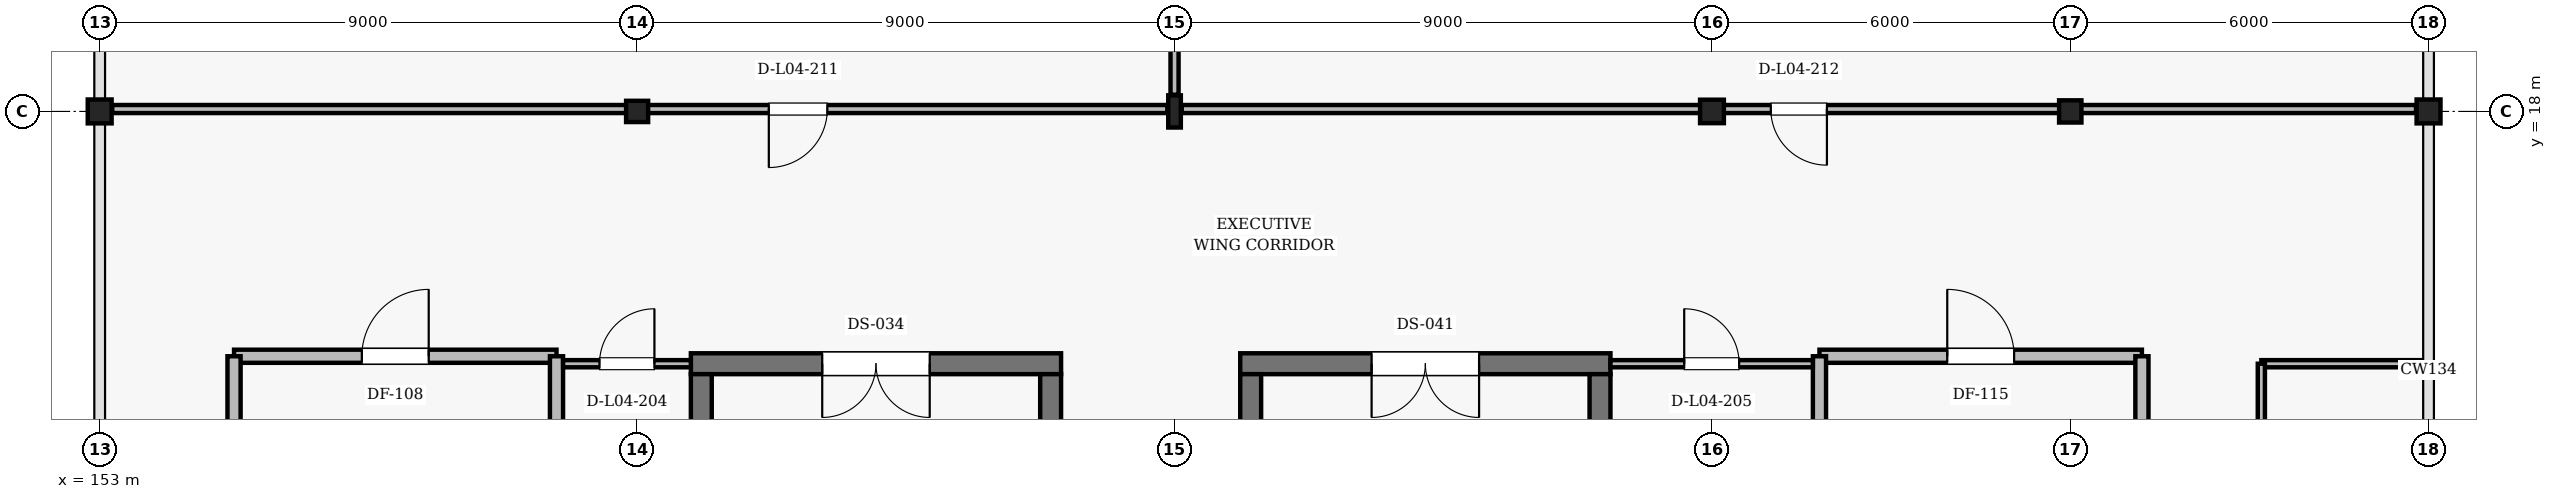
"""IFC4 building model, lengths in metres.
Left out: names, types, materials, properties, quantities, classifications, styles, units other than length and angle.
Written with IfcOpenShell. Run it as: python <this file> out.ifc"""

import sys

from ifc_helpers import new_model, si_unit, direction, frame, frame_2d, origin, origin_2d, place, context, subcontext, project, spatial, rectangle, hollow_rectangle, i_section, extrude, element, fill, save


model = new_model("IFC4")
c1 = context("Model", 3, precision=1e-05, world=origin(), true_north=direction((0.0, 1.0)))
c2 = subcontext(c1, "Body", "Model", "MODEL_VIEW")
j1 = project(units=[si_unit("LENGTHUNIT", "METRE"), si_unit("PLANEANGLEUNIT", "RADIAN")], contexts=[c1])
p1 = place(None, origin())
s1 = spatial("IfcSite", under=j1, at=p1, CompositionType="ELEMENT")
p2 = place(p1, origin())
s2 = spatial("IfcBuilding", under=s1, at=p2, CompositionType="ELEMENT")
p3 = place(p2, frame((0.0, 0.0, 20.4)))
s3 = spatial("IfcBuildingStorey", under=s2, at=p3, CompositionType="ELEMENT", Elevation=20.4)
p4 = place(p3, frame((153.0, 18.0, 0.0), z_axis=(0.0, 0.0, 1.0), x_axis=(1.0, 0.0, 0.0)))
e1 = element("IfcColumn", 1, at=p4, inside=s3, PredefinedType="COLUMN", context=c2, shape_type="SweptSolid", body=[
    extrude(hollow_rectangle(XDim=0.4, YDim=0.4, WallThickness=0.016, InnerFilletRadius=0.016, OuterFilletRadius=0.032, at=origin_2d()), origin(), (0.0, 0.0, 1.0), 4.8),
])
p5 = place(p3, frame((162.0, 18.0, 0.0), z_axis=(0.0, 0.0, 1.0), x_axis=(1.0, 0.0, 0.0)))
e2 = element("IfcColumn", 2, at=p5, inside=s3, PredefinedType="COLUMN", context=c2, shape_type="SweptSolid", body=[
    extrude(i_section(OverallWidth=0.369, OverallDepth=0.356, WebThickness=0.011, FlangeThickness=0.018, FilletRadius=0.015, at=origin_2d()), origin(), (0.0, 0.0, 1.0), 4.8),
])
p6 = place(p3, frame((171.0, 18.0, 0.0), z_axis=(0.0, 0.0, 1.0), x_axis=(1.0, 0.0, 0.0)))
e3 = element("IfcColumn", 3, at=p6, inside=s3, PredefinedType="COLUMN", context=c2, shape_type="SweptSolid", body=[
    extrude(i_section(OverallWidth=0.211, OverallDepth=0.539, WebThickness=0.012, FlangeThickness=0.019, FilletRadius=0.014, at=origin_2d()), origin(), (0.0, 0.0, 1.0), 4.8),
])
p7 = place(p3, frame((180.0, 18.0, 0.0), z_axis=(0.0, 0.0, 1.0), x_axis=(1.0, 0.0, 0.0)))
e4 = element("IfcColumn", 4, at=p7, inside=s3, PredefinedType="COLUMN", context=c2, shape_type="SweptSolid", body=[
    extrude(i_section(OverallWidth=0.399, OverallDepth=0.393, WebThickness=0.023, FlangeThickness=0.037, FilletRadius=0.018, at=origin_2d()), origin(), (0.0, 0.0, 1.0), 4.8),
])
p8 = place(p3, frame((186.0, 18.0, 0.0), z_axis=(0.0, 0.0, 1.0), x_axis=(1.0, 0.0, 0.0)))
e5 = element("IfcColumn", 5, at=p8, inside=s3, PredefinedType="COLUMN", context=c2, shape_type="SweptSolid", body=[
    extrude(i_section(OverallWidth=0.374, OverallDepth=0.372, WebThickness=0.016, FlangeThickness=0.026, FilletRadius=0.016, at=origin_2d()), origin(), (0.0, 0.0, 1.0), 4.8),
])
p9 = place(p3, frame((192.0, 18.0, 0.0), z_axis=(0.0, 0.0, 1.0), x_axis=(1.0, 0.0, 0.0)))
e6 = element("IfcColumn", 6, at=p9, inside=s3, PredefinedType="COLUMN", context=c2, shape_type="SweptSolid", body=[
    extrude(hollow_rectangle(XDim=0.4, YDim=0.4, WallThickness=0.016, InnerFilletRadius=0.016, OuterFilletRadius=0.032, at=origin_2d()), origin(), (0.0, 0.0, 1.0), 4.8),
])
p10 = place(p3, frame((169.1, 13.775, 0.0), z_axis=(0.0, 0.0, 1.0), x_axis=(-1.0, 0.0, 0.0)))
e7 = element("IfcWall", 7, at=p10, inside=s3, PredefinedType="SHEAR", context=c2, shape_type="SweptSolid", body=[
    extrude(rectangle(XDim=6.2, YDim=0.35, at=frame_2d((3.1, 0.0))), origin(), (0.0, 0.0, 1.0), 4.56),
])
p11 = place(p10, frame((2.2, 0.0, 0.0)))
e8 = element("IfcOpeningElement", 8, at=p11, cuts=e7, PredefinedType="OPENING", context=c2, shape_type="SweptSolid", body=[
    extrude(rectangle(XDim=1.8, YDim=2.2, at=frame_2d((0.9, 1.1))), frame((0.0, 0.185, 0.0), z_axis=(0.0, -1.0, 0.0), x_axis=(1.0, 0.0, 0.0)), (0.0, 0.0, 1.0), 0.37),
])
for number, where, z_axis, x_axis in (
    (9, (163.075, 13.6, 0.0), (0.0, 0.0, 1.0), (0.0, -1.0, 0.0)),
    (10, (168.925, 2.2, 0.0), (0.0, 0.0, 1.0), (0.0, 1.0, 0.0)),
):
    element("IfcWall", number, at=place(p3, frame(where, z_axis=z_axis, x_axis=x_axis)), inside=s3, PredefinedType="SHEAR", context=c2, shape_type="SweptSolid", body=[
        extrude(rectangle(XDim=11.4, YDim=0.35, at=frame_2d((5.7, 0.0))), origin(), (0.0, 0.0, 1.0), 4.56),
    ])
p12 = place(p3, frame((178.3, 13.775, 0.0), z_axis=(0.0, 0.0, 1.0), x_axis=(-1.0, 0.0, 0.0)))
e11 = element("IfcWall", 11, at=p12, inside=s3, PredefinedType="SHEAR", context=c2, shape_type="SweptSolid", body=[
    extrude(rectangle(XDim=6.2, YDim=0.35, at=frame_2d((3.1, 0.0))), origin(), (0.0, 0.0, 1.0), 4.56),
])
p13 = place(p12, frame((2.2, 0.0, 0.0)))
e12 = element("IfcOpeningElement", 12, at=p13, cuts=e11, PredefinedType="OPENING", context=c2, shape_type="SweptSolid", body=[
    extrude(rectangle(XDim=1.8, YDim=2.2, at=frame_2d((0.9, 1.1))), frame((0.0, 0.185, 0.0), z_axis=(0.0, -1.0, 0.0), x_axis=(1.0, 0.0, 0.0)), (0.0, 0.0, 1.0), 0.37),
])
for number, where, z_axis, x_axis in (
    (13, (172.275, 13.6, 0.0), (0.0, 0.0, 1.0), (0.0, -1.0, 0.0)),
    (14, (178.125, 2.2, 0.0), (0.0, 0.0, 1.0), (0.0, 1.0, 0.0)),
):
    element("IfcWall", number, at=place(p3, frame(where, z_axis=z_axis, x_axis=x_axis)), inside=s3, PredefinedType="SHEAR", context=c2, shape_type="SweptSolid", body=[
        extrude(rectangle(XDim=11.4, YDim=0.35, at=frame_2d((5.7, 0.0))), origin(), (0.0, 0.0, 1.0), 4.56),
    ])
p14 = place(p3, frame((155.25, 13.9, 0.0), z_axis=(0.0, 0.0, 1.0), x_axis=(1.0, 0.0, 0.0)))
e15 = element("IfcWall", 15, at=p14, inside=s3, PredefinedType="SOLIDWALL", context=c2, shape_type="SweptSolid", body=[
    extrude(rectangle(XDim=5.4, YDim=0.22, at=frame_2d((2.7, 0.0))), origin(), (0.0, 0.0, 1.0), 4.56),
])
p15 = place(p14, frame((2.14, 0.0, 0.0)))
e16 = element("IfcOpeningElement", 16, at=p15, cuts=e15, PredefinedType="OPENING", context=c2, shape_type="SweptSolid", body=[
    extrude(rectangle(XDim=1.12, YDim=2.2, at=frame_2d((0.56, 1.1))), frame((0.0, 0.12, 0.0), z_axis=(0.0, -1.0, 0.0), x_axis=(1.0, 0.0, 0.0)), (0.0, 0.0, 1.0), 0.24),
])
for number, where, z_axis, x_axis in (
    (17, (155.25, 10.85, 0.0), (0.0, 0.0, 1.0), (0.0, 1.0, 0.0)),
    (18, (160.65, 10.85, 0.0), (0.0, 0.0, 1.0), (0.0, 1.0, 0.0)),
):
    element("IfcWall", number, at=place(p3, frame(where, z_axis=z_axis, x_axis=x_axis)), inside=s3, PredefinedType="SOLIDWALL", context=c2, shape_type="SweptSolid", body=[
        extrude(rectangle(XDim=3.05, YDim=0.22, at=frame_2d((1.525, 0.0))), origin(), (0.0, 0.0, 1.0), 4.56),
    ])
p16 = place(p3, frame((181.8, 13.9, 0.0), z_axis=(0.0, 0.0, 1.0), x_axis=(1.0, 0.0, 0.0)))
e19 = element("IfcWall", 19, at=p16, inside=s3, PredefinedType="SOLIDWALL", context=c2, shape_type="SweptSolid", body=[
    extrude(rectangle(XDim=5.4, YDim=0.22, at=frame_2d((2.7, 0.0))), origin(), (0.0, 0.0, 1.0), 4.56),
])
p17 = place(p16, frame((2.14, 0.0, 0.0)))
e20 = element("IfcOpeningElement", 20, at=p17, cuts=e19, PredefinedType="OPENING", context=c2, shape_type="SweptSolid", body=[
    extrude(rectangle(XDim=1.12, YDim=2.2, at=frame_2d((0.56, 1.1))), frame((0.0, 0.12, 0.0), z_axis=(0.0, -1.0, 0.0), x_axis=(1.0, 0.0, 0.0)), (0.0, 0.0, 1.0), 0.24),
])
for number, where, z_axis, x_axis in (
    (21, (181.8, 10.85, 0.0), (0.0, 0.0, 1.0), (0.0, 1.0, 0.0)),
    (22, (187.2, 10.85, 0.0), (0.0, 0.0, 1.0), (0.0, 1.0, 0.0)),
):
    element("IfcWall", number, at=place(p3, frame(where, z_axis=z_axis, x_axis=x_axis)), inside=s3, PredefinedType="SOLIDWALL", context=c2, shape_type="SweptSolid", body=[
        extrude(rectangle(XDim=3.05, YDim=0.22, at=frame_2d((1.525, 0.0))), origin(), (0.0, 0.0, 1.0), 4.56),
    ])
p18 = place(p3, frame((160.76, 13.775, 0.0), z_axis=(0.0, 0.0, 1.0), x_axis=(1.0, 0.0, 0.0)))
e23 = element("IfcWall", 23, at=p18, inside=s3, PredefinedType="PARTITIONING", context=c2, shape_type="SweptSolid", body=[
    extrude(rectangle(XDim=2.14, YDim=0.12, at=frame_2d((1.07, 0.0))), origin(), (0.0, 0.0, 1.0), 3.772),
])
p19 = place(p18, frame((0.61, 0.0, 0.0)))
e24 = element("IfcOpeningElement", 24, at=p19, cuts=e23, PredefinedType="OPENING", context=c2, shape_type="SweptSolid", body=[
    extrude(rectangle(XDim=0.92, YDim=2.12, at=frame_2d((0.46, 1.06))), frame((0.0, 0.07, 0.0), z_axis=(0.0, -1.0, 0.0), x_axis=(1.0, 0.0, 0.0)), (0.0, 0.0, 1.0), 0.14),
])
p20 = place(p3, frame((178.3, 13.775, 0.0), z_axis=(0.0, 0.0, 1.0), x_axis=(1.0, 0.0, 0.0)))
e25 = element("IfcWall", 25, at=p20, inside=s3, PredefinedType="PARTITIONING", context=c2, shape_type="SweptSolid", body=[
    extrude(rectangle(XDim=3.39, YDim=0.12, at=frame_2d((1.695, 0.0))), origin(), (0.0, 0.0, 1.0), 3.772),
])
p21 = place(p20, frame((1.235, 0.0, 0.0)))
e26 = element("IfcOpeningElement", 26, at=p21, cuts=e25, PredefinedType="OPENING", context=c2, shape_type="SweptSolid", body=[
    extrude(rectangle(XDim=0.92, YDim=2.12, at=frame_2d((0.46, 1.06))), frame((0.0, 0.07, 0.0), z_axis=(0.0, -1.0, 0.0), x_axis=(1.0, 0.0, 0.0)), (0.0, 0.0, 1.0), 0.14),
])
p22 = place(p3, frame((189.2, 13.775, 0.0), z_axis=(0.0, 0.0, 1.0), x_axis=(1.0, 0.0, 0.0)))
e27 = element("IfcWall", 27, at=p22, inside=s3, PredefinedType="PARTITIONING", context=c2, shape_type="SweptSolid", body=[
    extrude(rectangle(XDim=2.788, YDim=0.12, at=frame_2d((1.394, 0.0))), origin(), (0.0, 0.0, 1.0), 4.006),
])
p23 = place(p3, frame((189.2, 9.65, 0.0), z_axis=(0.0, 0.0, 1.0), x_axis=(0.0, 1.0, 0.0)))
e28 = element("IfcWall", 28, at=p23, inside=s3, PredefinedType="PARTITIONING", context=c2, shape_type="SweptSolid", body=[
    extrude(rectangle(XDim=4.125, YDim=0.12, at=frame_2d((2.062, 0.0))), origin(), (0.0, 0.0, 1.0), 4.56),
])
p24 = place(p23, frame((1.552, 0.0, 0.0)))
e29 = element("IfcOpeningElement", 29, at=p24, cuts=e28, PredefinedType="OPENING", context=c2, shape_type="SweptSolid", body=[
    extrude(rectangle(XDim=1.02, YDim=2.16, at=frame_2d((0.51, 1.08))), frame((0.0, 0.07, 0.0), z_axis=(0.0, -1.0, 0.0), x_axis=(1.0, 0.0, 0.0)), (0.0, 0.0, 1.0), 0.14),
])
p25 = place(p3, frame((171.0, 36.0, 0.0), z_axis=(0.0, 0.0, 1.0), x_axis=(0.0, -1.0, 0.0)))
e30 = element("IfcWall", 30, at=p25, inside=s3, PredefinedType="PARTITIONING", context=c2, shape_type="SweptSolid", body=[
    extrude(rectangle(XDim=17.72, YDim=0.135, at=frame_2d((8.86, 0.0))), origin(), (0.0, 0.0, 1.0), 3.69),
])
p26 = place(p3, frame((170.88, 18.04, 0.0), z_axis=(0.0, 0.0, 1.0), x_axis=(-1.0, 0.0, 0.0)))
e31 = element("IfcWall", 31, at=p26, inside=s3, PredefinedType="PARTITIONING", context=c2, shape_type="SweptSolid", body=[
    extrude(rectangle(XDim=17.67, YDim=0.135, at=frame_2d((8.835, 0.0))), origin(), (0.0, 0.0, 1.0), 3.69),
])
p27 = place(p26, frame((5.695, 0.0, 0.0)))
e32 = element("IfcOpeningElement", 32, at=p27, cuts=e31, PredefinedType="OPENING", context=c2, shape_type="SweptSolid", body=[
    extrude(rectangle(XDim=0.98, YDim=2.15, at=frame_2d((0.49, 1.075))), frame((0.0, 0.078, 0.0), z_axis=(0.0, -1.0, 0.0), x_axis=(1.0, 0.0, 0.0)), (0.0, 0.0, 1.0), 0.155),
])
p28 = place(p3, frame((191.79, 18.04, 0.0), z_axis=(0.0, 0.0, 1.0), x_axis=(-1.0, 0.0, 0.0)))
e33 = element("IfcWall", 33, at=p28, inside=s3, PredefinedType="PARTITIONING", context=c2, shape_type="SweptSolid", body=[
    extrude(rectangle(XDim=20.67, YDim=0.135, at=frame_2d((10.335, 0.0))), origin(), (0.0, 0.0, 1.0), 3.69),
])
p29 = place(p28, frame((9.865, 0.0, 0.0)))
e34 = element("IfcOpeningElement", 34, at=p29, cuts=e33, PredefinedType="OPENING", context=c2, shape_type="SweptSolid", body=[
    extrude(rectangle(XDim=0.94, YDim=2.15, at=frame_2d((0.47, 1.075))), frame((0.0, 0.078, 0.0), z_axis=(0.0, -1.0, 0.0), x_axis=(1.0, 0.0, 0.0)), (0.0, 0.0, 1.0), 0.155),
])
p30 = place(p11, origin())
e35 = element("IfcDoor", 35, at=p30, inside=s3, OperationType="DOUBLE_DOOR_SINGLE_SWING", PredefinedType="DOOR", context=c2, shape_type="SweptSolid", body=[
    extrude(rectangle(XDim=1.8, YDim=2.2, at=frame_2d((0.9, 1.1))), frame((0.0, 0.025, 0.0), z_axis=(0.0, -1.0, 0.0), x_axis=(1.0, 0.0, 0.0)), (0.0, 0.0, 1.0), 0.05),
])
fill(e8, e35)
p31 = place(p13, origin())
e36 = element("IfcDoor", 36, at=p31, inside=s3, OperationType="DOUBLE_DOOR_SINGLE_SWING", PredefinedType="DOOR", context=c2, shape_type="SweptSolid", body=[
    extrude(rectangle(XDim=1.8, YDim=2.2, at=frame_2d((0.9, 1.1))), frame((0.0, 0.025, 0.0), z_axis=(0.0, -1.0, 0.0), x_axis=(1.0, 0.0, 0.0)), (0.0, 0.0, 1.0), 0.05),
])
fill(e12, e36)
p32 = place(p15, origin())
e37 = element("IfcDoor", 37, at=p32, inside=s3, OperationType="SINGLE_SWING_RIGHT", PredefinedType="DOOR", context=c2, shape_type="SweptSolid", body=[
    extrude(rectangle(XDim=1.12, YDim=2.2, at=frame_2d((0.56, 1.1))), frame((0.0, 0.025, 0.0), z_axis=(0.0, -1.0, 0.0), x_axis=(1.0, 0.0, 0.0)), (0.0, 0.0, 1.0), 0.05),
])
fill(e16, e37)
p33 = place(p17, origin())
e38 = element("IfcDoor", 38, at=p33, inside=s3, OperationType="SINGLE_SWING_LEFT", PredefinedType="DOOR", context=c2, shape_type="SweptSolid", body=[
    extrude(rectangle(XDim=1.12, YDim=2.2, at=frame_2d((0.56, 1.1))), frame((0.0, 0.025, 0.0), z_axis=(0.0, -1.0, 0.0), x_axis=(1.0, 0.0, 0.0)), (0.0, 0.0, 1.0), 0.05),
])
fill(e20, e38)
p34 = place(p19, origin())
e39 = element("IfcDoor", 39, at=p34, inside=s3, OperationType="SINGLE_SWING_RIGHT", PredefinedType="DOOR", context=c2, shape_type="SweptSolid", body=[
    extrude(rectangle(XDim=0.92, YDim=2.12, at=frame_2d((0.46, 1.06))), frame((0.0, 0.025, 0.0), z_axis=(0.0, -1.0, 0.0), x_axis=(1.0, 0.0, 0.0)), (0.0, 0.0, 1.0), 0.05),
])
fill(e24, e39)
p35 = place(p21, origin())
e40 = element("IfcDoor", 40, at=p35, inside=s3, OperationType="SINGLE_SWING_LEFT", PredefinedType="DOOR", context=c2, shape_type="SweptSolid", body=[
    extrude(rectangle(XDim=0.92, YDim=2.12, at=frame_2d((0.46, 1.06))), frame((0.0, 0.025, 0.0), z_axis=(0.0, -1.0, 0.0), x_axis=(1.0, 0.0, 0.0)), (0.0, 0.0, 1.0), 0.05),
])
fill(e26, e40)
p36 = place(p27, origin())
e41 = element("IfcDoor", 41, at=p36, inside=s3, OperationType="SINGLE_SWING_RIGHT", PredefinedType="DOOR", context=c2, shape_type="SweptSolid", body=[
    extrude(rectangle(XDim=0.98, YDim=2.15, at=frame_2d((0.49, 1.075))), frame((0.0, 0.025, 0.0), z_axis=(0.0, -1.0, 0.0), x_axis=(1.0, 0.0, 0.0)), (0.0, 0.0, 1.0), 0.05),
])
fill(e32, e41)
p37 = place(p29, origin())
e42 = element("IfcDoor", 42, at=p37, inside=s3, OperationType="SINGLE_SWING_LEFT", PredefinedType="DOOR", context=c2, shape_type="SweptSolid", body=[
    extrude(rectangle(XDim=0.94, YDim=2.15, at=frame_2d((0.47, 1.075))), frame((0.0, 0.025, 0.0), z_axis=(0.0, -1.0, 0.0), x_axis=(1.0, 0.0, 0.0)), (0.0, 0.0, 1.0), 0.05),
])
fill(e34, e42)
save(model, sys.argv[1])
